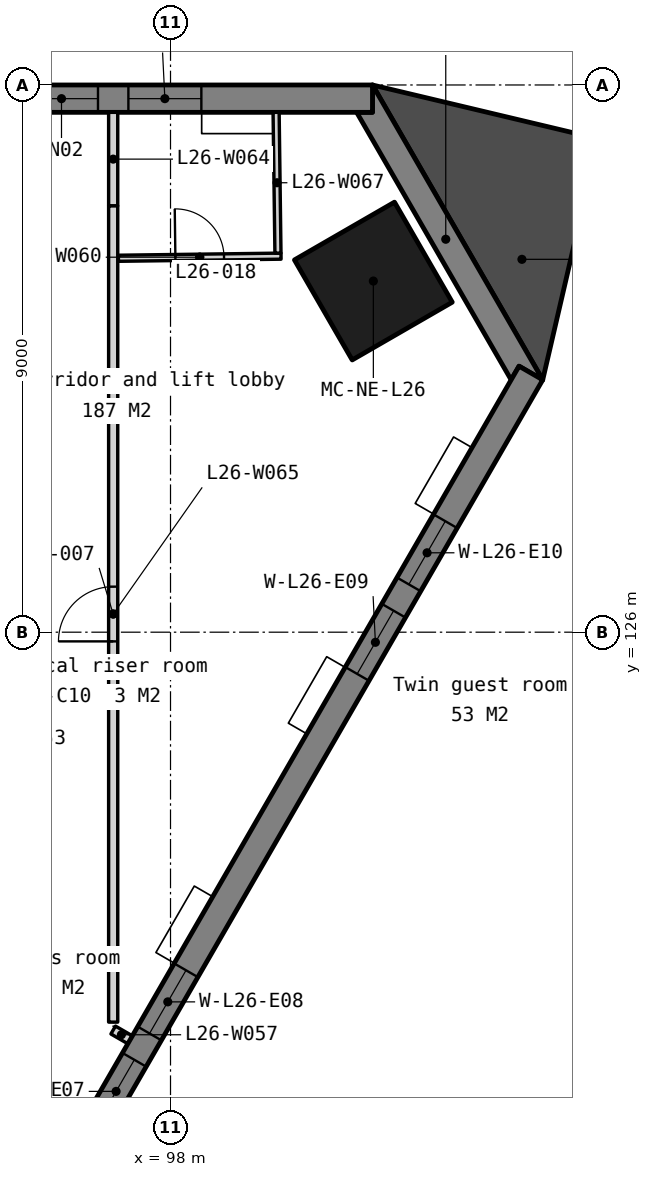
"""IFC4 building model, lengths in metres.
Left out: names, types, materials, properties, quantities, classifications, styles, units other than length and angle.
Written with IfcOpenShell. Run it as: python <this file> out.ifc"""

import sys

from ifc_helpers import new_model, si_unit, direction, frame, frame_2d, origin, origin_2d, place, context, subcontext, project, spatial, polyline, rectangle, outline, extrude, element, fill, save


model = new_model("IFC4")
c1 = context("Model", 3, precision=1e-05, world=origin(), true_north=direction((0.0, 1.0)))
c2 = subcontext(c1, "Body", "Model", "MODEL_VIEW")
j1 = project(units=[si_unit("LENGTHUNIT", "METRE"), si_unit("PLANEANGLEUNIT", "RADIAN")], contexts=[c1])
p1 = place(None, origin())
s1 = spatial("IfcSite", under=j1, at=p1, CompositionType="ELEMENT")
p2 = place(p1, origin())
s2 = spatial("IfcBuilding", under=s1, at=p2, CompositionType="ELEMENT")
p3 = place(p2, frame((0.0, 0.0, 106.3)))
s3 = spatial("IfcBuildingStorey", under=s2, at=p3, CompositionType="ELEMENT", Elevation=106.3)
p4 = place(p3, frame((101.336, 131.775, 0.0), z_axis=(0.0, 0.0, 1.0), x_axis=(-0.5, 0.866025403784, 0.0)))
e1 = element("IfcColumn", 1, at=p4, inside=s3, PredefinedType="COLUMN", context=c2, shape_type="SweptSolid", body=[
    extrude(rectangle(XDim=1.9, YDim=1.9, at=origin_2d()), origin(), (0.0, 0.0, 1.0), 3.5),
])
p5 = place(p3, frame((0.0, 0.0, -0.15)))
e2 = element("IfcWall", 2, at=p5, inside=s3, PredefinedType="SOLIDWALL", context=c2, shape_type="SweptSolid", body=[
    extrude(outline(polyline([(104.122, 130.15), (103.732, 130.375), (103.602, 130.15), (101.062, 134.55), (101.322, 134.55), (101.322, 135.0), (104.122, 130.15)])), origin(), (0.0, 0.0, 1.0), 3.5),
])
p6 = place(p3, frame((101.322, 134.775, -0.15), z_axis=(0.0, 0.0, 1.0), x_axis=(-1.0, 0.0, 0.0)))
e3 = element("IfcWall", 3, at=p6, inside=s3, PredefinedType="SOLIDWALL", context=c2, shape_type="SweptSolid", body=[
    extrude(outline(polyline([(42.643, 0.0), (42.643, 3.5), (0.0, 3.5), (0.0, 0.0), (42.643, 0.0)])), frame((0.0, 0.225, 0.0), z_axis=(0.0, -1.0, 0.0), x_axis=(1.0, 0.0, 0.0)), (0.0, 0.0, 1.0), 0.45),
])
p7 = place(p6, frame((2.814, 0.0, 1.05)))
e4 = element("IfcOpeningElement", 4, at=p7, cuts=e3, PredefinedType="OPENING", context=c2, shape_type="SweptSolid", body=[
    extrude(rectangle(XDim=1.2, YDim=1.5, at=frame_2d((0.6, 0.75))), frame((0.0, 0.235, 0.0), z_axis=(0.0, -1.0, 0.0), x_axis=(1.0, 0.0, 0.0)), (0.0, 0.0, 1.0), 0.47),
])
p8 = place(p6, frame((4.514, 0.0, 1.05)))
e5 = element("IfcOpeningElement", 5, at=p8, cuts=e3, PredefinedType="OPENING", context=c2, shape_type="SweptSolid", body=[
    extrude(rectangle(XDim=1.2, YDim=1.5, at=frame_2d((0.6, 0.75))), frame((0.0, 0.235, 0.0), z_axis=(0.0, -1.0, 0.0), x_axis=(1.0, 0.0, 0.0)), (0.0, 0.0, 1.0), 0.47),
])
p9 = place(p6, frame((11.343, 0.0, 1.05)))
e6 = element("IfcOpeningElement", 6, at=p9, cuts=e3, PredefinedType="OPENING", context=c2, shape_type="SweptSolid", body=[
    extrude(rectangle(XDim=1.2, YDim=1.5, at=frame_2d((0.6, 0.75))), frame((0.0, 0.235, 0.0), z_axis=(0.0, -1.0, 0.0), x_axis=(1.0, 0.0, 0.0)), (0.0, 0.0, 1.0), 0.47),
])
p10 = place(p6, frame((13.043, 0.0, 1.05)))
e7 = element("IfcOpeningElement", 7, at=p10, cuts=e3, PredefinedType="OPENING", context=c2, shape_type="SweptSolid", body=[
    extrude(rectangle(XDim=1.2, YDim=1.5, at=frame_2d((0.6, 0.75))), frame((0.0, 0.235, 0.0), z_axis=(0.0, -1.0, 0.0), x_axis=(1.0, 0.0, 0.0)), (0.0, 0.0, 1.0), 0.47),
])
p11 = place(p6, frame((19.872, 0.0, 1.05)))
e8 = element("IfcOpeningElement", 8, at=p11, cuts=e3, PredefinedType="OPENING", context=c2, shape_type="SweptSolid", body=[
    extrude(rectangle(XDim=1.2, YDim=1.5, at=frame_2d((0.6, 0.75))), frame((0.0, 0.235, 0.0), z_axis=(0.0, -1.0, 0.0), x_axis=(1.0, 0.0, 0.0)), (0.0, 0.0, 1.0), 0.47),
])
p12 = place(p6, frame((21.572, 0.0, 1.05)))
e9 = element("IfcOpeningElement", 9, at=p12, cuts=e3, PredefinedType="OPENING", context=c2, shape_type="SweptSolid", body=[
    extrude(rectangle(XDim=1.2, YDim=1.5, at=frame_2d((0.6, 0.75))), frame((0.0, 0.235, 0.0), z_axis=(0.0, -1.0, 0.0), x_axis=(1.0, 0.0, 0.0)), (0.0, 0.0, 1.0), 0.47),
])
p13 = place(p6, frame((28.4, 0.0, 1.05)))
e10 = element("IfcOpeningElement", 10, at=p13, cuts=e3, PredefinedType="OPENING", context=c2, shape_type="SweptSolid", body=[
    extrude(rectangle(XDim=1.2, YDim=1.5, at=frame_2d((0.6, 0.75))), frame((0.0, 0.235, 0.0), z_axis=(0.0, -1.0, 0.0), x_axis=(1.0, 0.0, 0.0)), (0.0, 0.0, 1.0), 0.47),
])
p14 = place(p6, frame((30.1, 0.0, 1.05)))
e11 = element("IfcOpeningElement", 11, at=p14, cuts=e3, PredefinedType="OPENING", context=c2, shape_type="SweptSolid", body=[
    extrude(rectangle(XDim=1.2, YDim=1.5, at=frame_2d((0.6, 0.75))), frame((0.0, 0.235, 0.0), z_axis=(0.0, -1.0, 0.0), x_axis=(1.0, 0.0, 0.0)), (0.0, 0.0, 1.0), 0.47),
])
p15 = place(p6, frame((36.929, 0.0, 1.05)))
e12 = element("IfcOpeningElement", 12, at=p15, cuts=e3, PredefinedType="OPENING", context=c2, shape_type="SweptSolid", body=[
    extrude(rectangle(XDim=1.2, YDim=1.5, at=frame_2d((0.6, 0.75))), frame((0.0, 0.235, 0.0), z_axis=(0.0, -1.0, 0.0), x_axis=(1.0, 0.0, 0.0)), (0.0, 0.0, 1.0), 0.47),
])
p16 = place(p6, frame((38.629, 0.0, 1.05)))
e13 = element("IfcOpeningElement", 13, at=p16, cuts=e3, PredefinedType="OPENING", context=c2, shape_type="SweptSolid", body=[
    extrude(rectangle(XDim=1.2, YDim=1.5, at=frame_2d((0.6, 0.75))), frame((0.0, 0.235, 0.0), z_axis=(0.0, -1.0, 0.0), x_axis=(1.0, 0.0, 0.0)), (0.0, 0.0, 1.0), 0.47),
])
p17 = place(p3, frame((82.605, 93.333, -0.15), z_axis=(0.0, 0.0, 1.0), x_axis=(0.500000478905, 0.866025127289, 0.0)))
e14 = element("IfcWall", 14, at=p17, inside=s3, PredefinedType="SOLIDWALL", context=c2, shape_type="SweptSolid", body=[
    extrude(outline(polyline([(42.643, 0.0), (42.643, 3.5), (0.0, 3.5), (0.0, 0.0), (42.643, 0.0)])), frame((0.0, 0.225, 0.0), z_axis=(0.0, -1.0, 0.0), x_axis=(1.0, 0.0, 0.0)), (0.0, 0.0, 1.0), 0.45),
])
p18 = place(p17, frame((2.814, 0.0, 1.05)))
e15 = element("IfcOpeningElement", 15, at=p18, cuts=e14, PredefinedType="OPENING", context=c2, shape_type="SweptSolid", body=[
    extrude(rectangle(XDim=1.2, YDim=1.5, at=frame_2d((0.6, 0.75))), frame((0.0, 0.235, 0.0), z_axis=(0.0, -1.0, 0.0), x_axis=(1.0, 0.0, 0.0)), (0.0, 0.0, 1.0), 0.47),
])
p19 = place(p17, frame((4.514, 0.0, 1.05)))
e16 = element("IfcOpeningElement", 16, at=p19, cuts=e14, PredefinedType="OPENING", context=c2, shape_type="SweptSolid", body=[
    extrude(rectangle(XDim=1.2, YDim=1.5, at=frame_2d((0.6, 0.75))), frame((0.0, 0.235, 0.0), z_axis=(0.0, -1.0, 0.0), x_axis=(1.0, 0.0, 0.0)), (0.0, 0.0, 1.0), 0.47),
])
p20 = place(p17, frame((11.343, 0.0, 1.05)))
e17 = element("IfcOpeningElement", 17, at=p20, cuts=e14, PredefinedType="OPENING", context=c2, shape_type="SweptSolid", body=[
    extrude(rectangle(XDim=1.2, YDim=1.5, at=frame_2d((0.6, 0.75))), frame((0.0, 0.235, 0.0), z_axis=(0.0, -1.0, 0.0), x_axis=(1.0, 0.0, 0.0)), (0.0, 0.0, 1.0), 0.47),
])
p21 = place(p17, frame((13.043, 0.0, 1.05)))
e18 = element("IfcOpeningElement", 18, at=p21, cuts=e14, PredefinedType="OPENING", context=c2, shape_type="SweptSolid", body=[
    extrude(rectangle(XDim=1.2, YDim=1.5, at=frame_2d((0.6, 0.75))), frame((0.0, 0.235, 0.0), z_axis=(0.0, -1.0, 0.0), x_axis=(1.0, 0.0, 0.0)), (0.0, 0.0, 1.0), 0.47),
])
p22 = place(p17, frame((19.872, 0.0, 1.05)))
e19 = element("IfcOpeningElement", 19, at=p22, cuts=e14, PredefinedType="OPENING", context=c2, shape_type="SweptSolid", body=[
    extrude(rectangle(XDim=1.2, YDim=1.5, at=frame_2d((0.6, 0.75))), frame((0.0, 0.235, 0.0), z_axis=(0.0, -1.0, 0.0), x_axis=(1.0, 0.0, 0.0)), (0.0, 0.0, 1.0), 0.47),
])
p23 = place(p17, frame((21.572, 0.0, 1.05)))
e20 = element("IfcOpeningElement", 20, at=p23, cuts=e14, PredefinedType="OPENING", context=c2, shape_type="SweptSolid", body=[
    extrude(rectangle(XDim=1.2, YDim=1.5, at=frame_2d((0.6, 0.75))), frame((0.0, 0.235, 0.0), z_axis=(0.0, -1.0, 0.0), x_axis=(1.0, 0.0, 0.0)), (0.0, 0.0, 1.0), 0.47),
])
p24 = place(p17, frame((28.4, 0.0, 1.05)))
e21 = element("IfcOpeningElement", 21, at=p24, cuts=e14, PredefinedType="OPENING", context=c2, shape_type="SweptSolid", body=[
    extrude(rectangle(XDim=1.2, YDim=1.5, at=frame_2d((0.6, 0.75))), frame((0.0, 0.235, 0.0), z_axis=(0.0, -1.0, 0.0), x_axis=(1.0, 0.0, 0.0)), (0.0, 0.0, 1.0), 0.47),
])
p25 = place(p17, frame((30.1, 0.0, 1.05)))
e22 = element("IfcOpeningElement", 22, at=p25, cuts=e14, PredefinedType="OPENING", context=c2, shape_type="SweptSolid", body=[
    extrude(rectangle(XDim=1.2, YDim=1.5, at=frame_2d((0.6, 0.75))), frame((0.0, 0.235, 0.0), z_axis=(0.0, -1.0, 0.0), x_axis=(1.0, 0.0, 0.0)), (0.0, 0.0, 1.0), 0.47),
])
p26 = place(p17, frame((36.929, 0.0, 1.05)))
e23 = element("IfcOpeningElement", 23, at=p26, cuts=e14, PredefinedType="OPENING", context=c2, shape_type="SweptSolid", body=[
    extrude(rectangle(XDim=1.2, YDim=1.5, at=frame_2d((0.6, 0.75))), frame((0.0, 0.235, 0.0), z_axis=(0.0, -1.0, 0.0), x_axis=(1.0, 0.0, 0.0)), (0.0, 0.0, 1.0), 0.47),
])
p27 = place(p17, frame((38.629, 0.0, 1.05)))
e24 = element("IfcOpeningElement", 24, at=p27, cuts=e14, PredefinedType="OPENING", context=c2, shape_type="SweptSolid", body=[
    extrude(rectangle(XDim=1.2, YDim=1.5, at=frame_2d((0.6, 0.75))), frame((0.0, 0.235, 0.0), z_axis=(0.0, -1.0, 0.0), x_axis=(1.0, 0.0, 0.0)), (0.0, 0.0, 1.0), 0.47),
])
p28 = place(p3, frame((0.0, 0.0, -0.15)))
e25 = element("IfcWall", 25, at=p28, inside=s3, PredefinedType="SOLIDWALL", context=c2, shape_type="SweptSolid", body=[
    extrude(outline(polyline([(104.122, 130.15), (105.042, 134.115), (101.322, 135.0), (104.122, 130.15)])), origin(), (0.0, 0.0, 1.0), 3.5),
])
p29 = place(p3, frame((97.057, 119.457, 0.0), z_axis=(0.0, 0.0, 1.0), x_axis=(0.866159461733, -0.499767732902, 0.0)))
e26 = element("IfcWall", 26, at=p29, inside=s3, PredefinedType="PARTITIONING", context=c2, shape_type="SweptSolid", body=[
    extrude(rectangle(XDim=0.311, YDim=0.15, at=frame_2d((0.156, 0.0))), origin(), (0.0, 0.0, 1.0), 3.35),
])
p30 = place(p3, frame((97.143, 132.15, 0.0), z_axis=(0.0, 0.0, 1.0), x_axis=(0.999914830804, 0.013051097189, 0.0)))
e27 = element("IfcWall", 27, at=p30, inside=s3, PredefinedType="PARTITIONING", context=c2, shape_type="SweptSolid", body=[
    extrude(rectangle(XDim=2.675, YDim=0.1, at=frame_2d((1.337, 0.0))), origin(), (0.0, 0.0, 1.0), 3.35),
])
p31 = place(p30, frame((0.938, 0.0, 0.0)))
e28 = element("IfcOpeningElement", 28, at=p31, cuts=e27, PredefinedType="OPENING", context=c2, shape_type="SweptSolid", body=[
    extrude(rectangle(XDim=0.8, YDim=2.1, at=frame_2d((0.4, 1.05))), frame((0.0, 0.06, 0.0), z_axis=(0.0, -1.0, 0.0), x_axis=(1.0, 0.0, 0.0)), (0.0, 0.0, 1.0), 0.12),
])
p32 = place(p3, frame((97.057, 133.011, 0.0), z_axis=(0.0, 0.0, 1.0), x_axis=(0.0, 1.0, 0.0)))
e29 = element("IfcWall", 29, at=p32, inside=s3, PredefinedType="PARTITIONING", context=c2, shape_type="SweptSolid", body=[
    extrude(rectangle(XDim=1.539, YDim=0.15, at=frame_2d((0.77, 0.0))), origin(), (0.0, 0.0, 1.0), 3.35),
])
p33 = place(p3, frame((97.057, 119.587, 0.0), z_axis=(0.0, 0.0, 1.0), x_axis=(0.0, 1.0, 0.0)))
e30 = element("IfcWall", 30, at=p33, inside=s3, PredefinedType="PARTITIONING", context=c2, shape_type="SweptSolid", body=[
    extrude(rectangle(XDim=13.424, YDim=0.15, at=frame_2d((6.712, 0.0))), origin(), (0.0, 0.0, 1.0), 3.35),
])
p34 = place(p33, frame((6.262, 0.0, 0.0)))
e31 = element("IfcOpeningElement", 31, at=p34, cuts=e30, PredefinedType="OPENING", context=c2, shape_type="SweptSolid", body=[
    extrude(rectangle(XDim=0.9, YDim=2.1, at=frame_2d((0.45, 1.05))), frame((0.0, 0.085, 0.0), z_axis=(0.0, -1.0, 0.0), x_axis=(1.0, 0.0, 0.0)), (0.0, 0.0, 1.0), 0.17),
])
p35 = place(p3, frame((99.737, 134.55, 0.0), z_axis=(0.0, 0.0, 1.0), x_axis=(0.012965387027, -0.999915945837, 0.0)))
e32 = element("IfcWall", 32, at=p35, inside=s3, PredefinedType="PARTITIONING", context=c2, shape_type="SweptSolid", body=[
    extrude(rectangle(XDim=2.316, YDim=0.1, at=frame_2d((1.158, 0.0))), origin(), (0.0, 0.0, 1.0), 3.35),
])
p36 = place(p7, origin())
e33 = element("IfcWindow", 33, at=p36, inside=s3, PartitioningType="SINGLE_PANEL", PredefinedType="WINDOW", context=c2, shape_type="SweptSolid", body=[
    extrude(rectangle(XDim=1.2, YDim=1.5, at=frame_2d((0.6, 0.75))), frame((0.0, 0.03, 0.0), z_axis=(0.0, -1.0, 0.0), x_axis=(1.0, 0.0, 0.0)), (0.0, 0.0, 1.0), 0.06),
])
fill(e4, e33)
p37 = place(p8, origin())
e34 = element("IfcWindow", 34, at=p37, inside=s3, PartitioningType="SINGLE_PANEL", PredefinedType="WINDOW", context=c2, shape_type="SweptSolid", body=[
    extrude(rectangle(XDim=1.2, YDim=1.5, at=frame_2d((0.6, 0.75))), frame((0.0, 0.03, 0.0), z_axis=(0.0, -1.0, 0.0), x_axis=(1.0, 0.0, 0.0)), (0.0, 0.0, 1.0), 0.06),
])
fill(e5, e34)
p38 = place(p24, origin())
e35 = element("IfcWindow", 35, at=p38, inside=s3, PartitioningType="SINGLE_PANEL", PredefinedType="WINDOW", context=c2, shape_type="SweptSolid", body=[
    extrude(rectangle(XDim=1.2, YDim=1.5, at=frame_2d((0.6, 0.75))), frame((0.0, 0.03, 0.0), z_axis=(0.0, -1.0, 0.0), x_axis=(1.0, 0.0, 0.0)), (0.0, 0.0, 1.0), 0.06),
])
fill(e21, e35)
p39 = place(p25, origin())
e36 = element("IfcWindow", 36, at=p39, inside=s3, PartitioningType="SINGLE_PANEL", PredefinedType="WINDOW", context=c2, shape_type="SweptSolid", body=[
    extrude(rectangle(XDim=1.2, YDim=1.5, at=frame_2d((0.6, 0.75))), frame((0.0, 0.03, 0.0), z_axis=(0.0, -1.0, 0.0), x_axis=(1.0, 0.0, 0.0)), (0.0, 0.0, 1.0), 0.06),
])
fill(e22, e36)
p40 = place(p26, origin())
e37 = element("IfcWindow", 37, at=p40, inside=s3, PartitioningType="SINGLE_PANEL", PredefinedType="WINDOW", context=c2, shape_type="SweptSolid", body=[
    extrude(rectangle(XDim=1.2, YDim=1.5, at=frame_2d((0.6, 0.75))), frame((0.0, 0.03, 0.0), z_axis=(0.0, -1.0, 0.0), x_axis=(1.0, 0.0, 0.0)), (0.0, 0.0, 1.0), 0.06),
])
fill(e23, e37)
p41 = place(p27, origin())
e38 = element("IfcWindow", 38, at=p41, inside=s3, PartitioningType="SINGLE_PANEL", PredefinedType="WINDOW", context=c2, shape_type="SweptSolid", body=[
    extrude(rectangle(XDim=1.2, YDim=1.5, at=frame_2d((0.6, 0.75))), frame((0.0, 0.03, 0.0), z_axis=(0.0, -1.0, 0.0), x_axis=(1.0, 0.0, 0.0)), (0.0, 0.0, 1.0), 0.06),
])
fill(e24, e38)
p42 = place(p34, origin())
e39 = element("IfcDoor", 39, at=p42, inside=s3, OperationType="SINGLE_SWING_LEFT", PredefinedType="DOOR", context=c2, shape_type="SweptSolid", body=[
    extrude(rectangle(XDim=0.9, YDim=2.1, at=frame_2d((0.45, 1.05))), frame((0.0, 0.025, 0.0), z_axis=(0.0, -1.0, 0.0), x_axis=(1.0, 0.0, 0.0)), (0.0, 0.0, 1.0), 0.05),
])
fill(e31, e39)
p43 = place(p31, origin())
e40 = element("IfcDoor", 40, at=p43, inside=s3, OperationType="SINGLE_SWING_LEFT", PredefinedType="DOOR", context=c2, shape_type="SweptSolid", body=[
    extrude(rectangle(XDim=0.8, YDim=2.1, at=frame_2d((0.4, 1.05))), frame((0.0, 0.025, 0.0), z_axis=(0.0, -1.0, 0.0), x_axis=(1.0, 0.0, 0.0)), (0.0, 0.0, 1.0), 0.05),
])
fill(e28, e40)
save(model, sys.argv[1])
